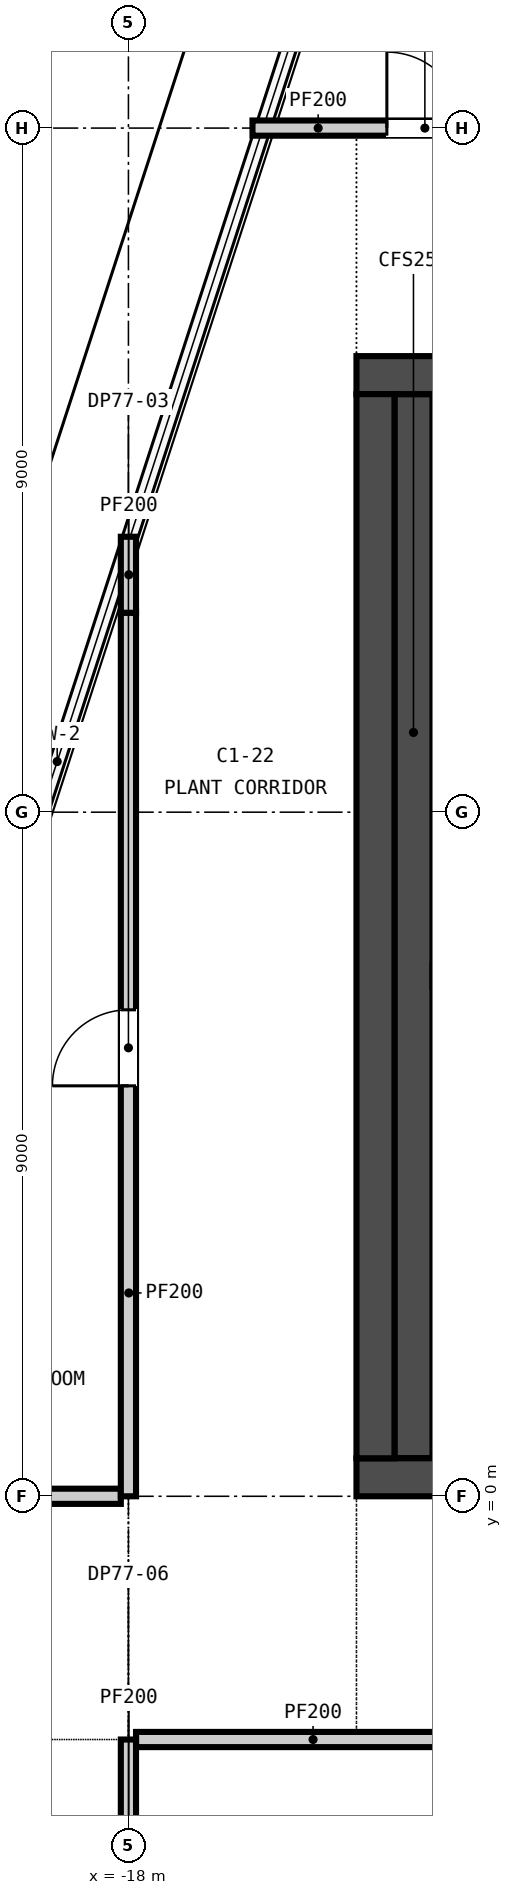
"""IFC4 building model, lengths in metres.
Left out: names, types, materials, properties, quantities, classifications, styles, units other than length and angle.
Written with IfcOpenShell. Run it as: python <this file> out.ifc"""

import sys

from ifc_helpers import new_model, si_unit, direction, frame, frame_2d, origin, place, context, subcontext, project, spatial, rectangle, extrude, element, fill, save


model = new_model("IFC4")
c1 = context("Model", 3, precision=1e-05, world=origin(), true_north=direction((0.0, 1.0)))
c2 = subcontext(c1, "Body", "Model", "MODEL_VIEW")
j1 = project(units=[si_unit("LENGTHUNIT", "METRE"), si_unit("PLANEANGLEUNIT", "RADIAN")], contexts=[c1])
p1 = place(None, origin())
s1 = spatial("IfcSite", under=j1, at=p1, CompositionType="ELEMENT")
p2 = place(p1, origin())
s2 = spatial("IfcBuilding", under=s1, at=p2, CompositionType="ELEMENT")
p3 = place(p2, frame((0.0, 0.0, 301.1)))
s3 = spatial("IfcBuildingStorey", under=s2, at=p3, CompositionType="ELEMENT", Elevation=301.1)
p4 = place(p3, frame((-15.0, 0.25, -0.25), z_axis=(0.0, 0.0, 1.0), x_axis=(1.0, 0.0, 0.0)))
e1 = element("IfcWall", 1, at=p4, inside=s3, PredefinedType="SOLIDWALL", context=c2, shape_type="SweptSolid", body=[
    extrude(rectangle(XDim=30.0, YDim=0.5, at=frame_2d((15.0, 0.0))), origin(), (0.0, 0.0, 1.0), 5.0),
])
p5 = place(p3, frame((-15.0, 14.75, -0.25), z_axis=(0.0, 0.0, 1.0), x_axis=(1.0, 0.0, 0.0)))
e2 = element("IfcWall", 2, at=p5, inside=s3, PredefinedType="SOLIDWALL", context=c2, shape_type="SweptSolid", body=[
    extrude(rectangle(XDim=30.0, YDim=0.5, at=frame_2d((15.0, 0.0))), origin(), (0.0, 0.0, 1.0), 5.0),
])
p6 = place(p5, frame((9.25, 0.0, 0.25)))
e3 = element("IfcOpeningElement", 3, at=p6, cuts=e2, PredefinedType="OPENING", context=c2, shape_type="SweptSolid", body=[
    extrude(rectangle(XDim=1.5, YDim=2.1, at=frame_2d((0.75, 1.05))), frame((0.0, 0.26, 0.0), z_axis=(0.0, -1.0, 0.0), x_axis=(1.0, 0.0, 0.0)), (0.0, 0.0, 1.0), 0.52),
])
p7 = place(p5, frame((19.4, 0.0, 0.25)))
e4 = element("IfcOpeningElement", 4, at=p7, cuts=e2, PredefinedType="OPENING", context=c2, shape_type="SweptSolid", body=[
    extrude(rectangle(XDim=1.5, YDim=2.1, at=frame_2d((0.75, 1.05))), frame((0.0, 0.26, 0.0), z_axis=(0.0, -1.0, 0.0), x_axis=(1.0, 0.0, 0.0)), (0.0, 0.0, 1.0), 0.52),
])
p8 = place(p5, frame((1.5, 0.0, 0.25)))
e5 = element("IfcOpeningElement", 5, at=p8, cuts=e2, PredefinedType="OPENING", context=c2, shape_type="SweptSolid", body=[
    extrude(rectangle(XDim=1.2, YDim=2.1, at=frame_2d((0.6, 1.05))), frame((0.0, 0.26, 0.0), z_axis=(0.0, -1.0, 0.0), x_axis=(1.0, 0.0, 0.0)), (0.0, 0.0, 1.0), 0.52),
])
p9 = place(p5, frame((27.3, 0.0, 0.25)))
e6 = element("IfcOpeningElement", 6, at=p9, cuts=e2, PredefinedType="OPENING", context=c2, shape_type="SweptSolid", body=[
    extrude(rectangle(XDim=1.2, YDim=2.1, at=frame_2d((0.6, 1.05))), frame((0.0, 0.26, 0.0), z_axis=(0.0, -1.0, 0.0), x_axis=(1.0, 0.0, 0.0)), (0.0, 0.0, 1.0), 0.52),
])
p10 = place(p3, frame((-14.75, 0.5, -0.25), z_axis=(0.0, 0.0, 1.0), x_axis=(0.0, 1.0, 0.0)))
e7 = element("IfcWall", 7, at=p10, inside=s3, PredefinedType="SOLIDWALL", context=c2, shape_type="SweptSolid", body=[
    extrude(rectangle(XDim=14.0, YDim=0.5, at=frame_2d((7.0, 0.0))), origin(), (0.0, 0.0, 1.0), 5.0),
])
p11 = place(p3, frame((-14.25, 0.5, 0.0), z_axis=(0.0, 0.0, 1.0), x_axis=(0.0, 1.0, 0.0)))
e8 = element("IfcWall", 8, at=p11, inside=s3, PredefinedType="SOLIDWALL", context=c2, shape_type="SweptSolid", body=[
    extrude(rectangle(XDim=14.0, YDim=0.5, at=frame_2d((7.0, 0.0))), origin(), (0.0, 0.0, 1.0), 4.75),
])
p12 = place(p3, frame((-17.9, -3.2, 0.0), z_axis=(0.0, 0.0, 1.0), x_axis=(1.0, 0.0, 0.0)))
e9 = element("IfcWall", 9, at=p12, inside=s3, PredefinedType="PARTITIONING", context=c2, shape_type="SweptSolid", body=[
    extrude(rectangle(XDim=4.648, YDim=0.2, at=frame_2d((2.324, 0.0))), origin(), (0.0, 0.0, 1.0), 4.75),
])
p13 = place(p3, frame((-22.216, 0.0, 0.0), z_axis=(0.0, 0.0, 1.0), x_axis=(1.0, 0.0, 0.0)))
e10 = element("IfcWall", 10, at=p13, inside=s3, PredefinedType="PARTITIONING", context=c2, shape_type="SweptSolid", body=[
    extrude(rectangle(XDim=4.116, YDim=0.2, at=frame_2d((2.058, 0.0))), origin(), (0.0, 0.0, 1.0), 4.75),
])
p14 = place(p3, frame((-16.368, 18.0, 0.0), z_axis=(0.0, 0.0, 1.0), x_axis=(1.0, 0.0, 0.0)))
e11 = element("IfcWall", 11, at=p14, inside=s3, PredefinedType="PARTITIONING", context=c2, shape_type="SweptSolid", body=[
    extrude(rectangle(XDim=3.354, YDim=0.2, at=frame_2d((1.677, 0.0))), origin(), (0.0, 0.0, 1.0), 4.75),
])
p15 = place(p14, frame((1.768, 0.0, 0.0)))
e12 = element("IfcOpeningElement", 12, at=p15, cuts=e11, PredefinedType="OPENING", context=c2, shape_type="SweptSolid", body=[
    extrude(rectangle(XDim=1.0, YDim=2.1, at=frame_2d((0.5, 1.05))), frame((0.0, 0.11, 0.0), z_axis=(0.0, -1.0, 0.0), x_axis=(1.0, 0.0, 0.0)), (0.0, 0.0, 1.0), 0.22),
])
p16 = place(p3, frame((-18.0, -7.104, 0.0), z_axis=(0.0, 0.0, 1.0), x_axis=(0.0, 1.0, 0.0)))
e13 = element("IfcWall", 13, at=p16, inside=s3, PredefinedType="PARTITIONING", context=c2, shape_type="SweptSolid", body=[
    extrude(rectangle(XDim=3.904, YDim=0.2, at=frame_2d((1.952, 0.0))), origin(), (0.0, 0.0, 1.0), 4.75),
])
p17 = place(p3, frame((-18.0, 0.0, 0.0), z_axis=(0.0, 0.0, 1.0), x_axis=(0.0, 1.0, 0.0)))
e14 = element("IfcWall", 14, at=p17, inside=s3, PredefinedType="PARTITIONING", context=c2, shape_type="SweptSolid", body=[
    extrude(rectangle(XDim=11.624, YDim=0.2, at=frame_2d((5.812, 0.0))), origin(), (0.0, 0.0, 1.0), 4.75),
])
p18 = place(p17, frame((5.4, 0.0, 0.0)))
e15 = element("IfcOpeningElement", 15, at=p18, cuts=e14, PredefinedType="OPENING", context=c2, shape_type="SweptSolid", body=[
    extrude(rectangle(XDim=1.0, YDim=2.1, at=frame_2d((0.5, 1.05))), frame((0.0, 0.11, 0.0), z_axis=(0.0, -1.0, 0.0), x_axis=(1.0, 0.0, 0.0)), (0.0, 0.0, 1.0), 0.22),
])
p19 = place(p3, frame((-18.0, 11.624, 0.0), z_axis=(0.0, 0.0, 1.0), x_axis=(0.0, 1.0, 0.0)))
e16 = element("IfcWall", 16, at=p19, inside=s3, PredefinedType="PARTITIONING", context=c2, shape_type="SweptSolid", body=[
    extrude(rectangle(XDim=1.0, YDim=0.2, at=frame_2d((0.5, 0.0))), origin(), (0.0, 0.0, 1.0), 4.134),
])
p20 = place(p15, origin())
e17 = element("IfcDoor", 17, at=p20, inside=s3, OperationType="SINGLE_SWING_LEFT", PredefinedType="DOOR", context=c2, shape_type="SweptSolid", body=[
    extrude(rectangle(XDim=1.0, YDim=2.1, at=frame_2d((0.5, 1.05))), frame((0.0, 0.025, 0.0), z_axis=(0.0, -1.0, 0.0), x_axis=(1.0, 0.0, 0.0)), (0.0, 0.0, 1.0), 0.05),
])
fill(e12, e17)
p21 = place(p18, origin())
e18 = element("IfcDoor", 18, at=p21, inside=s3, OperationType="SINGLE_SWING_LEFT", PredefinedType="DOOR", context=c2, shape_type="SweptSolid", body=[
    extrude(rectangle(XDim=1.0, YDim=2.1, at=frame_2d((0.5, 1.05))), frame((0.0, 0.025, 0.0), z_axis=(0.0, -1.0, 0.0), x_axis=(1.0, 0.0, 0.0)), (0.0, 0.0, 1.0), 0.05),
])
fill(e15, e18)
save(model, sys.argv[1])
